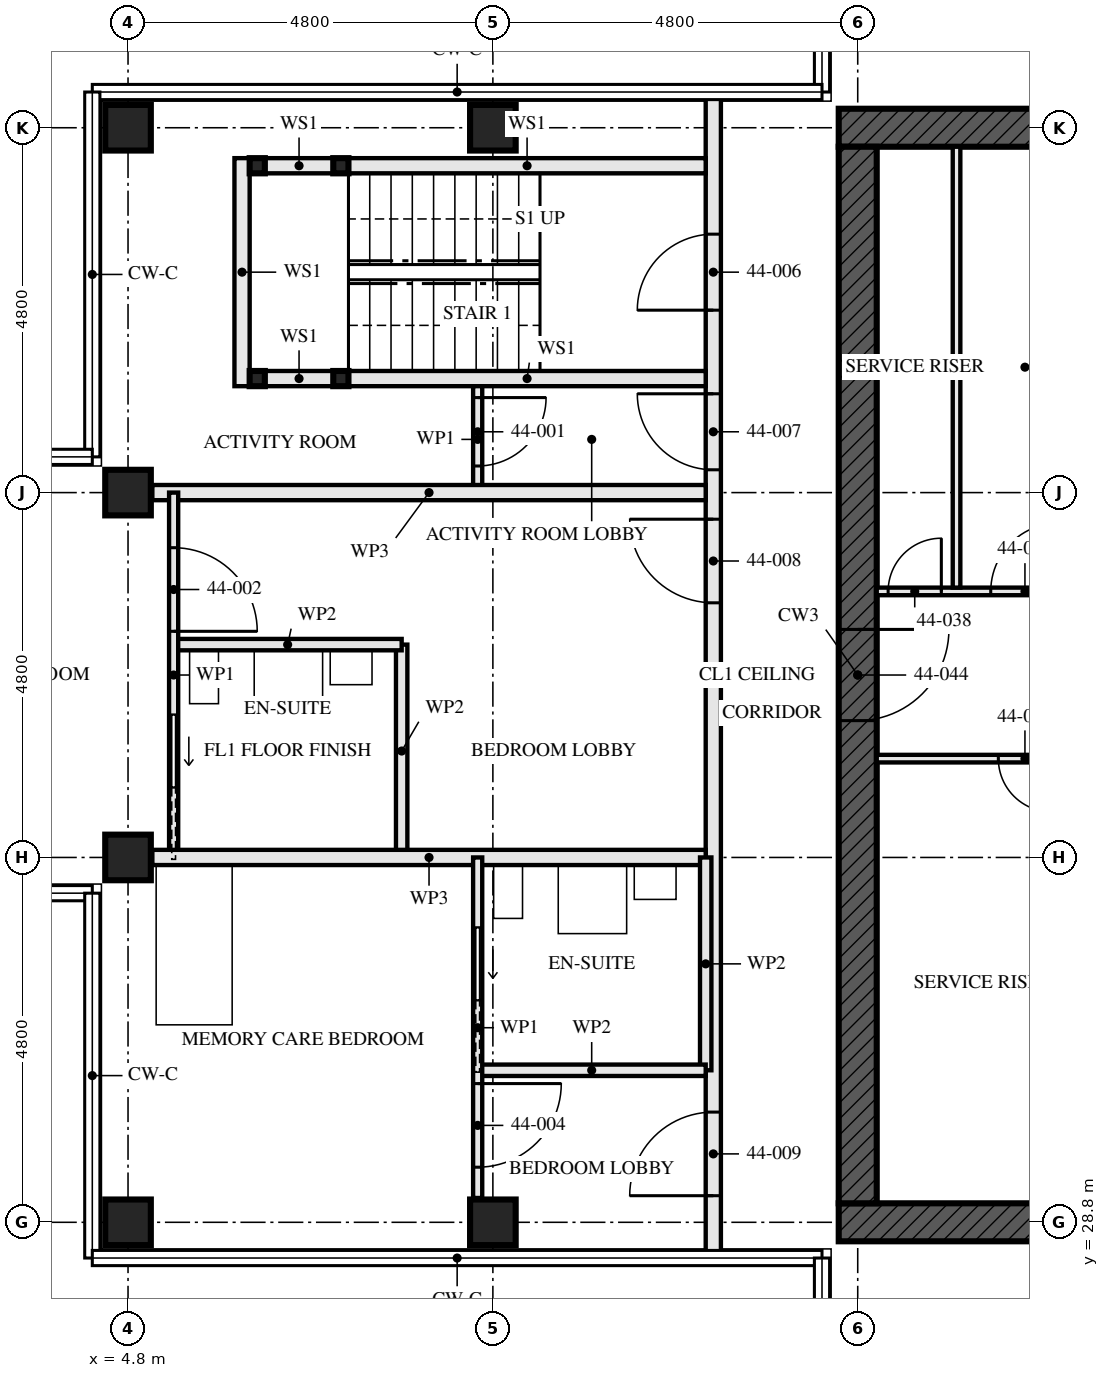
"""IFC4 building model, lengths in metres.
Left out: names, types, materials, properties, quantities, classifications, styles, units other than length and angle.
Written with IfcOpenShell. Run it as: python <this file> out.ifc"""

import sys

from ifc_helpers import new_model, si_unit, direction, frame, frame_2d, origin, origin_2d, place, context, subcontext, project, spatial, rectangle, hollow_rectangle, extrude, element, fill, save


model = new_model("IFC4")
c1 = context("Model", 3, precision=1e-05, world=origin(), true_north=direction((0.0, 1.0)))
c2 = subcontext(c1, "Body", "Model", "MODEL_VIEW")
j1 = project(units=[si_unit("LENGTHUNIT", "METRE"), si_unit("PLANEANGLEUNIT", "RADIAN")], contexts=[c1])
p1 = place(None, origin())
s1 = spatial("IfcSite", under=j1, at=p1, CompositionType="ELEMENT")
p2 = place(p1, origin())
s2 = spatial("IfcBuilding", under=s1, at=p2, CompositionType="ELEMENT")
p3 = place(p2, frame((0.0, 0.0, 162.0)))
s3 = spatial("IfcBuildingStorey", under=s2, at=p3, CompositionType="ELEMENT", Elevation=162.0)
for number, where, z_axis, x_axis in (
    (1, (4.8, 28.8, 0.0), (0.0, 0.0, 1.0), (0.0, 1.0, 0.0)),
    (2, (4.8, 33.6, 0.0), (0.0, 0.0, 1.0), (0.0, 1.0, 0.0)),
    (3, (4.8, 38.4, 0.0), (0.0, 0.0, 1.0), (0.0, 1.0, 0.0)),
    (4, (4.8, 43.2, 0.0), (0.0, 0.0, 1.0), (0.0, 1.0, 0.0)),
):
    element("IfcColumn", number, at=place(p3, frame(where, z_axis=z_axis, x_axis=x_axis)), inside=s3, PredefinedType="COLUMN", context=c2, shape_type="SweptSolid", body=[
        extrude(hollow_rectangle(XDim=0.6, YDim=0.6, WallThickness=0.06, at=origin_2d()), origin(), (0.0, 0.0, 1.0), 3.5),
    ])
for number, where, z_axis, x_axis in (
    (5, (9.6, 28.8, 0.0), (0.0, 0.0, 1.0), (0.0, 1.0, 0.0)),
    (6, (9.6, 43.2, 0.0), (0.0, 0.0, 1.0), (0.0, 1.0, 0.0)),
):
    element("IfcColumn", number, at=place(p3, frame(where, z_axis=z_axis, x_axis=x_axis)), inside=s3, PredefinedType="COLUMN", context=c2, shape_type="SweptSolid", body=[
        extrude(hollow_rectangle(XDim=0.6, YDim=0.6, WallThickness=0.08, at=origin_2d()), origin(), (0.0, 0.0, 1.0), 3.5),
    ])
p4 = place(p3, frame((14.15, 28.8, -0.17), z_axis=(0.0, 0.0, 1.0), x_axis=(1.0, 0.0, 0.0)))
e7 = element("IfcWall", 7, at=p4, inside=s3, PredefinedType="SHEAR", context=c2, shape_type="SweptSolid", body=[
    extrude(rectangle(XDim=14.9, YDim=0.5, at=frame_2d((7.45, 0.0))), origin(), (0.0, 0.0, 1.0), 3.5),
])
p5 = place(p4, frame((6.85, 0.0, 0.17)))
e8 = element("IfcOpeningElement", 8, at=p5, cuts=e7, PredefinedType="OPENING", context=c2, shape_type="SweptSolid", body=[
    extrude(rectangle(XDim=1.2, YDim=2.1, at=frame_2d((0.6, 1.05))), frame((0.0, 0.26, 0.0), z_axis=(0.0, -1.0, 0.0), x_axis=(1.0, 0.0, 0.0)), (0.0, 0.0, 1.0), 0.521),
])
p6 = place(p3, frame((29.05, 43.2, -0.17), z_axis=(0.0, 0.0, 1.0), x_axis=(-1.0, 0.0, 0.0)))
e9 = element("IfcWall", 9, at=p6, inside=s3, PredefinedType="SHEAR", context=c2, shape_type="SweptSolid", body=[
    extrude(rectangle(XDim=14.9, YDim=0.5, at=frame_2d((7.45, 0.0))), origin(), (0.0, 0.0, 1.0), 3.5),
])
p7 = place(p6, frame((6.85, 0.0, 0.17)))
e10 = element("IfcOpeningElement", 10, at=p7, cuts=e9, PredefinedType="OPENING", context=c2, shape_type="SweptSolid", body=[
    extrude(rectangle(XDim=1.2, YDim=2.1, at=frame_2d((0.6, 1.05))), frame((0.0, 0.26, 0.0), z_axis=(0.0, -1.0, 0.0), x_axis=(1.0, 0.0, 0.0)), (0.0, 0.0, 1.0), 0.521),
])
p8 = place(p3, frame((14.4, 42.95, -0.17), z_axis=(0.0, 0.0, 1.0), x_axis=(0.0, -1.0, 0.0)))
e11 = element("IfcWall", 11, at=p8, inside=s3, PredefinedType="SHEAR", context=c2, shape_type="SweptSolid", body=[
    extrude(rectangle(XDim=13.9, YDim=0.5, at=frame_2d((6.95, 0.0))), origin(), (0.0, 0.0, 1.0), 3.5),
])
p9 = place(p8, frame((6.35, 0.0, 0.17)))
e12 = element("IfcOpeningElement", 12, at=p9, cuts=e11, PredefinedType="OPENING", context=c2, shape_type="SweptSolid", body=[
    extrude(rectangle(XDim=1.2, YDim=2.1, at=frame_2d((0.6, 1.05))), frame((0.0, 0.26, 0.0), z_axis=(0.0, -1.0, 0.0), x_axis=(1.0, 0.0, 0.0)), (0.0, 0.0, 1.0), 0.521),
])
for number, where, z_axis, x_axis in (
    (13, (6.5, 42.7, 0.0), (0.0, 0.0, 1.0), (1.0, 0.0, 0.0)),
    (14, (6.5, 39.9, 0.0), (0.0, 0.0, 1.0), (1.0, 0.0, 0.0)),
    (15, (7.6, 42.7, 0.0), (0.0, 0.0, 1.0), (1.0, 0.0, 0.0)),
    (16, (7.6, 39.9, 0.0), (0.0, 0.0, 1.0), (1.0, 0.0, 0.0)),
):
    element("IfcColumn", number, at=place(p3, frame(where, z_axis=z_axis, x_axis=x_axis)), inside=s3, PredefinedType="COLUMN", context=c2, shape_type="SweptSolid", body=[
        extrude(hollow_rectangle(XDim=0.2, YDim=0.2, WallThickness=0.008, at=origin_2d()), origin(), (0.0, 0.0, 1.0), 3.33),
    ])
p10 = place(p3, frame((6.6, 42.7, 0.0), z_axis=(0.0, 0.0, 1.0), x_axis=(1.0, 0.0, 0.0)))
e17 = element("IfcWall", 17, at=p10, inside=s3, PredefinedType="SOLIDWALL", context=c2, shape_type="SweptSolid", body=[
    extrude(rectangle(XDim=0.9, YDim=0.2, at=frame_2d((0.45, 0.0))), origin(), (0.0, 0.0, 1.0), 2.99),
])
p11 = place(p3, frame((7.7, 42.7, 0.0), z_axis=(0.0, 0.0, 1.0), x_axis=(1.0, 0.0, 0.0)))
e18 = element("IfcWall", 18, at=p11, inside=s3, PredefinedType="SOLIDWALL", context=c2, shape_type="SweptSolid", body=[
    extrude(rectangle(XDim=4.7, YDim=0.2, at=frame_2d((2.35, 0.0))), origin(), (0.0, 0.0, 1.0), 2.99),
])
p12 = place(p3, frame((6.6, 39.9, 0.0), z_axis=(0.0, 0.0, 1.0), x_axis=(1.0, 0.0, 0.0)))
e19 = element("IfcWall", 19, at=p12, inside=s3, PredefinedType="SOLIDWALL", context=c2, shape_type="SweptSolid", body=[
    extrude(rectangle(XDim=0.9, YDim=0.2, at=frame_2d((0.45, 0.0))), origin(), (0.0, 0.0, 1.0), 2.99),
])
p13 = place(p3, frame((7.7, 39.9, 0.0), z_axis=(0.0, 0.0, 1.0), x_axis=(1.0, 0.0, 0.0)))
e20 = element("IfcWall", 20, at=p13, inside=s3, PredefinedType="SOLIDWALL", context=c2, shape_type="SweptSolid", body=[
    extrude(rectangle(XDim=4.7, YDim=0.2, at=frame_2d((2.35, 0.0))), origin(), (0.0, 0.0, 1.0), 2.99),
])
p14 = place(p3, frame((6.3, 42.8, 0.0), z_axis=(0.0, 0.0, 1.0), x_axis=(0.0, -1.0, 0.0)))
e21 = element("IfcWall", 21, at=p14, inside=s3, PredefinedType="SOLIDWALL", context=c2, shape_type="SweptSolid", body=[
    extrude(rectangle(XDim=3.0, YDim=0.2, at=frame_2d((1.5, 0.0))), origin(), (0.0, 0.0, 1.0), 3.33),
])
p15 = place(p3, frame((9.4, 39.8, 0.0), z_axis=(0.0, 0.0, 1.0), x_axis=(0.0, -1.0, 0.0)))
e22 = element("IfcWall", 22, at=p15, inside=s3, PredefinedType="PARTITIONING", context=c2, shape_type="SweptSolid", body=[
    extrude(rectangle(XDim=1.4, YDim=0.12, at=frame_2d((0.7, 0.0))), origin(), (0.0, 0.0, 1.0), 3.33),
])
p16 = place(p15, frame((0.15, 0.0, 0.0)))
e23 = element("IfcOpeningElement", 23, at=p16, cuts=e22, PredefinedType="OPENING", context=c2, shape_type="SweptSolid", body=[
    extrude(rectangle(XDim=0.9, YDim=2.1, at=frame_2d((0.45, 1.05))), frame((0.0, 0.071, 0.0), z_axis=(0.0, -1.0, 0.0), x_axis=(1.0, 0.0, 0.0)), (0.0, 0.0, 1.0), 0.141),
])
p17 = place(p3, frame((5.12, 38.4, 0.0), z_axis=(0.0, 0.0, 1.0), x_axis=(1.0, 0.0, 0.0)))
e24 = element("IfcWall", 24, at=p17, inside=s3, PredefinedType="PARTITIONING", context=c2, shape_type="SweptSolid", body=[
    extrude(rectangle(XDim=7.28, YDim=0.2, at=frame_2d((3.64, 0.0))), origin(), (0.0, 0.0, 1.0), 2.55),
])
p18 = place(p3, frame((5.4, 36.4, 0.0), z_axis=(0.0, 0.0, 1.0), x_axis=(1.0, 0.0, 0.0)))
e25 = element("IfcWall", 25, at=p18, inside=s3, PredefinedType="PARTITIONING", context=c2, shape_type="SweptSolid", body=[
    extrude(rectangle(XDim=3.0, YDim=0.15, at=frame_2d((1.5, 0.0))), origin(), (0.0, 0.0, 1.0), 3.33),
])
p19 = place(p3, frame((8.4, 36.4, 0.0), z_axis=(0.0, 0.0, 1.0), x_axis=(0.0, -1.0, 0.0)))
e26 = element("IfcWall", 26, at=p19, inside=s3, PredefinedType="PARTITIONING", context=c2, shape_type="SweptSolid", body=[
    extrude(rectangle(XDim=2.8, YDim=0.15, at=frame_2d((1.4, 0.0))), origin(), (0.0, 0.0, 1.0), 3.33),
])
p20 = place(p3, frame((5.4, 38.4, 0.0), z_axis=(0.0, 0.0, 1.0), x_axis=(0.0, -1.0, 0.0)))
e27 = element("IfcWall", 27, at=p20, inside=s3, PredefinedType="PARTITIONING", context=c2, shape_type="SweptSolid", body=[
    extrude(rectangle(XDim=4.8, YDim=0.12, at=frame_2d((2.4, 0.0))), origin(), (0.0, 0.0, 1.0), 3.33),
])
p21 = place(p20, frame((0.725, 0.0, 0.0)))
e28 = element("IfcOpeningElement", 28, at=p21, cuts=e27, PredefinedType="OPENING", context=c2, shape_type="SweptSolid", body=[
    extrude(rectangle(XDim=1.1, YDim=2.1, at=frame_2d((0.55, 1.05))), frame((0.0, 0.071, 0.0), z_axis=(0.0, -1.0, 0.0), x_axis=(1.0, 0.0, 0.0)), (0.0, 0.0, 1.0), 0.141),
])
p22 = place(p20, frame((2.925, 0.0, 0.0)))
e29 = element("IfcOpeningElement", 29, at=p22, cuts=e27, PredefinedType="OPENING", context=c2, shape_type="SweptSolid", body=[
    extrude(rectangle(XDim=0.95, YDim=2.1, at=frame_2d((0.475, 1.05))), frame((0.0, 0.071, 0.0), z_axis=(0.0, -1.0, 0.0), x_axis=(1.0, 0.0, 0.0)), (0.0, 0.0, 1.0), 0.141),
])
p23 = place(p3, frame((5.12, 33.6, 0.0), z_axis=(0.0, 0.0, 1.0), x_axis=(1.0, 0.0, 0.0)))
e30 = element("IfcWall", 30, at=p23, inside=s3, PredefinedType="PARTITIONING", context=c2, shape_type="SweptSolid", body=[
    extrude(rectangle(XDim=7.28, YDim=0.2, at=frame_2d((3.64, 0.0))), origin(), (0.0, 0.0, 1.0), 2.55),
])
p24 = place(p3, frame((9.4, 30.8, 0.0), z_axis=(0.0, 0.0, 1.0), x_axis=(1.0, 0.0, 0.0)))
e31 = element("IfcWall", 31, at=p24, inside=s3, PredefinedType="PARTITIONING", context=c2, shape_type="SweptSolid", body=[
    extrude(rectangle(XDim=3.0, YDim=0.15, at=frame_2d((1.5, 0.0))), origin(), (0.0, 0.0, 1.0), 3.33),
])
p25 = place(p3, frame((12.4, 33.6, 0.0), z_axis=(0.0, 0.0, 1.0), x_axis=(0.0, -1.0, 0.0)))
e32 = element("IfcWall", 32, at=p25, inside=s3, PredefinedType="PARTITIONING", context=c2, shape_type="SweptSolid", body=[
    extrude(rectangle(XDim=2.8, YDim=0.15, at=frame_2d((1.4, 0.0))), origin(), (0.0, 0.0, 1.0), 3.33),
])
p26 = place(p3, frame((9.4, 33.6, 0.0), z_axis=(0.0, 0.0, 1.0), x_axis=(0.0, -1.0, 0.0)))
e33 = element("IfcWall", 33, at=p26, inside=s3, PredefinedType="PARTITIONING", context=c2, shape_type="SweptSolid", body=[
    extrude(rectangle(XDim=4.48, YDim=0.12, at=frame_2d((2.24, 0.0))), origin(), (0.0, 0.0, 1.0), 3.33),
])
p27 = place(p26, frame((2.975, 0.0, 0.0)))
e34 = element("IfcOpeningElement", 34, at=p27, cuts=e33, PredefinedType="OPENING", context=c2, shape_type="SweptSolid", body=[
    extrude(rectangle(XDim=1.1, YDim=2.1, at=frame_2d((0.55, 1.05))), frame((0.0, 0.071, 0.0), z_axis=(0.0, -1.0, 0.0), x_axis=(1.0, 0.0, 0.0)), (0.0, 0.0, 1.0), 0.141),
])
p28 = place(p26, frame((0.925, 0.0, 0.0)))
e35 = element("IfcOpeningElement", 35, at=p28, cuts=e33, PredefinedType="OPENING", context=c2, shape_type="SweptSolid", body=[
    extrude(rectangle(XDim=0.95, YDim=2.1, at=frame_2d((0.475, 1.05))), frame((0.0, 0.071, 0.0), z_axis=(0.0, -1.0, 0.0), x_axis=(1.0, 0.0, 0.0)), (0.0, 0.0, 1.0), 0.141),
])
p29 = place(p3, frame((12.5, 43.65, 0.0), z_axis=(0.0, 0.0, 1.0), x_axis=(0.0, -1.0, 0.0)))
e36 = element("IfcWall", 36, at=p29, inside=s3, PredefinedType="PARTITIONING", context=c2, shape_type="SweptSolid", body=[
    extrude(rectangle(XDim=15.3, YDim=0.2, at=frame_2d((7.65, 0.0))), origin(), (0.0, 0.0, 1.0), 2.32),
])
p30 = place(p29, frame((1.85, 0.0, 0.0)))
e37 = element("IfcOpeningElement", 37, at=p30, cuts=e36, PredefinedType="OPENING", context=c2, shape_type="SweptSolid", body=[
    extrude(rectangle(XDim=1.0, YDim=2.1, at=frame_2d((0.5, 1.05))), frame((0.0, 0.111, 0.0), z_axis=(0.0, -1.0, 0.0), x_axis=(1.0, 0.0, 0.0)), (0.0, 0.0, 1.0), 0.221),
])
p31 = place(p29, frame((3.95, 0.0, 0.0)))
e38 = element("IfcOpeningElement", 38, at=p31, cuts=e36, PredefinedType="OPENING", context=c2, shape_type="SweptSolid", body=[
    extrude(rectangle(XDim=1.0, YDim=2.1, at=frame_2d((0.5, 1.05))), frame((0.0, 0.111, 0.0), z_axis=(0.0, -1.0, 0.0), x_axis=(1.0, 0.0, 0.0)), (0.0, 0.0, 1.0), 0.221),
])
p32 = place(p29, frame((5.6, 0.0, 0.0)))
e39 = element("IfcOpeningElement", 39, at=p32, cuts=e36, PredefinedType="OPENING", context=c2, shape_type="SweptSolid", body=[
    extrude(rectangle(XDim=1.1, YDim=2.1, at=frame_2d((0.55, 1.05))), frame((0.0, 0.111, 0.0), z_axis=(0.0, -1.0, 0.0), x_axis=(1.0, 0.0, 0.0)), (0.0, 0.0, 1.0), 0.221),
])
p33 = place(p29, frame((13.4, 0.0, 0.0)))
e40 = element("IfcOpeningElement", 40, at=p33, cuts=e36, PredefinedType="OPENING", context=c2, shape_type="SweptSolid", body=[
    extrude(rectangle(XDim=1.1, YDim=2.1, at=frame_2d((0.55, 1.05))), frame((0.0, 0.111, 0.0), z_axis=(0.0, -1.0, 0.0), x_axis=(1.0, 0.0, 0.0)), (0.0, 0.0, 1.0), 0.221),
])
p34 = place(p3, frame((15.7, 37.15, 0.0), z_axis=(0.0, 0.0, 1.0), x_axis=(0.0, 1.0, 0.0)))
e41 = element("IfcWall", 41, at=p34, inside=s3, PredefinedType="SOLIDWALL", context=c2, shape_type="SweptSolid", body=[
    extrude(rectangle(XDim=5.8, YDim=0.1, at=frame_2d((2.9, 0.0))), origin(), (0.0, 0.0, 1.0), 3.33),
])
p35 = place(p3, frame((14.65, 34.9, 0.0), z_axis=(0.0, 0.0, 1.0), x_axis=(1.0, 0.0, 0.0)))
e42 = element("IfcWall", 42, at=p35, inside=s3, PredefinedType="SOLIDWALL", context=c2, shape_type="SweptSolid", body=[
    extrude(rectangle(XDim=5.9, YDim=0.1, at=frame_2d((2.95, 0.0))), origin(), (0.0, 0.0, 1.0), 3.33),
])
p36 = place(p35, frame((1.6, 0.0, 0.0)))
e43 = element("IfcOpeningElement", 43, at=p36, cuts=e42, PredefinedType="OPENING", context=c2, shape_type="SweptSolid", body=[
    extrude(rectangle(XDim=0.7, YDim=2.1, at=frame_2d((0.35, 1.05))), frame((0.0, 0.061, 0.0), z_axis=(0.0, -1.0, 0.0), x_axis=(1.0, 0.0, 0.0)), (0.0, 0.0, 1.0), 0.121),
])
p37 = place(p3, frame((14.65, 37.1, 0.0), z_axis=(0.0, 0.0, 1.0), x_axis=(1.0, 0.0, 0.0)))
e44 = element("IfcWall", 44, at=p37, inside=s3, PredefinedType="SOLIDWALL", context=c2, shape_type="SweptSolid", body=[
    extrude(rectangle(XDim=5.9, YDim=0.1, at=frame_2d((2.95, 0.0))), origin(), (0.0, 0.0, 1.0), 3.33),
])
p38 = place(p37, frame((0.15, 0.0, 0.0)))
e45 = element("IfcOpeningElement", 45, at=p38, cuts=e44, PredefinedType="OPENING", context=c2, shape_type="SweptSolid", body=[
    extrude(rectangle(XDim=0.7, YDim=2.1, at=frame_2d((0.35, 1.05))), frame((0.0, 0.061, 0.0), z_axis=(0.0, -1.0, 0.0), x_axis=(1.0, 0.0, 0.0)), (0.0, 0.0, 1.0), 0.121),
])
p39 = place(p37, frame((1.5, 0.0, 0.0)))
e46 = element("IfcOpeningElement", 46, at=p39, cuts=e44, PredefinedType="OPENING", context=c2, shape_type="SweptSolid", body=[
    extrude(rectangle(XDim=0.9, YDim=2.1, at=frame_2d((0.45, 1.05))), frame((0.0, 0.061, 0.0), z_axis=(0.0, -1.0, 0.0), x_axis=(1.0, 0.0, 0.0)), (0.0, 0.0, 1.0), 0.121),
])
p40 = place(p16, origin())
e47 = element("IfcDoor", 47, at=p40, inside=s3, OperationType="SINGLE_SWING_RIGHT", PredefinedType="DOOR", context=c2, shape_type="SweptSolid", body=[
    extrude(rectangle(XDim=0.9, YDim=2.1, at=frame_2d((0.45, 1.05))), frame((0.0, 0.022, 0.0), z_axis=(0.0, -1.0, 0.0), x_axis=(1.0, 0.0, 0.0)), (0.0, 0.0, 1.0), 0.044),
])
fill(e23, e47)
p41 = place(p21, origin())
e48 = element("IfcDoor", 48, at=p41, inside=s3, OperationType="SINGLE_SWING_LEFT", PredefinedType="DOOR", context=c2, shape_type="SweptSolid", body=[
    extrude(rectangle(XDim=1.1, YDim=2.1, at=frame_2d((0.55, 1.05))), frame((0.0, 0.022, 0.0), z_axis=(0.0, -1.0, 0.0), x_axis=(1.0, 0.0, 0.0)), (0.0, 0.0, 1.0), 0.044),
])
fill(e28, e48)
p42 = place(p22, origin())
e49 = element("IfcDoor", 49, at=p42, inside=s3, OperationType="SLIDING_TO_LEFT", PredefinedType="DOOR", context=c2, shape_type="SweptSolid", body=[
    extrude(rectangle(XDim=0.95, YDim=2.1, at=frame_2d((0.475, 1.05))), frame((0.0, 0.022, 0.0), z_axis=(0.0, -1.0, 0.0), x_axis=(1.0, 0.0, 0.0)), (0.0, 0.0, 1.0), 0.044),
])
fill(e29, e49)
p43 = place(p27, origin())
e50 = element("IfcDoor", 50, at=p43, inside=s3, OperationType="SINGLE_SWING_RIGHT", PredefinedType="DOOR", context=c2, shape_type="SweptSolid", body=[
    extrude(rectangle(XDim=1.1, YDim=2.1, at=frame_2d((0.55, 1.05))), frame((0.0, 0.022, 0.0), z_axis=(0.0, -1.0, 0.0), x_axis=(1.0, 0.0, 0.0)), (0.0, 0.0, 1.0), 0.044),
])
fill(e34, e50)
p44 = place(p28, origin())
e51 = element("IfcDoor", 51, at=p44, inside=s3, OperationType="SLIDING_TO_LEFT", PredefinedType="DOOR", context=c2, shape_type="SweptSolid", body=[
    extrude(rectangle(XDim=0.95, YDim=2.1, at=frame_2d((0.475, 1.05))), frame((0.0, 0.022, 0.0), z_axis=(0.0, -1.0, 0.0), x_axis=(1.0, 0.0, 0.0)), (0.0, 0.0, 1.0), 0.044),
])
fill(e35, e51)
p45 = place(p30, frame((1.0, 0.0, 0.0), z_axis=(0.0, 0.0, 1.0), x_axis=(-1.0, 0.0, 0.0)))
e52 = element("IfcDoor", 52, at=p45, inside=s3, OperationType="SINGLE_SWING_RIGHT", PredefinedType="DOOR", context=c2, shape_type="SweptSolid", body=[
    extrude(rectangle(XDim=1.0, YDim=2.1, at=frame_2d((0.5, 1.05))), frame((0.0, 0.032, 0.0), z_axis=(0.0, -1.0, 0.0), x_axis=(1.0, 0.0, 0.0)), (0.0, 0.0, 1.0), 0.064),
])
fill(e37, e52)
p46 = place(p31, frame((1.0, 0.0, 0.0), z_axis=(0.0, 0.0, 1.0), x_axis=(-1.0, 0.0, 0.0)))
e53 = element("IfcDoor", 53, at=p46, inside=s3, OperationType="SINGLE_SWING_LEFT", PredefinedType="DOOR", context=c2, shape_type="SweptSolid", body=[
    extrude(rectangle(XDim=1.0, YDim=2.1, at=frame_2d((0.5, 1.05))), frame((0.0, 0.027, 0.0), z_axis=(0.0, -1.0, 0.0), x_axis=(1.0, 0.0, 0.0)), (0.0, 0.0, 1.0), 0.054),
])
fill(e38, e53)
p47 = place(p32, frame((1.1, 0.0, 0.0), z_axis=(0.0, 0.0, 1.0), x_axis=(-1.0, 0.0, 0.0)))
e54 = element("IfcDoor", 54, at=p47, inside=s3, OperationType="SINGLE_SWING_LEFT", PredefinedType="DOOR", context=c2, shape_type="SweptSolid", body=[
    extrude(rectangle(XDim=1.1, YDim=2.1, at=frame_2d((0.55, 1.05))), frame((0.0, 0.027, 0.0), z_axis=(0.0, -1.0, 0.0), x_axis=(1.0, 0.0, 0.0)), (0.0, 0.0, 1.0), 0.054),
])
fill(e39, e54)
p48 = place(p33, frame((1.1, 0.0, 0.0), z_axis=(0.0, 0.0, 1.0), x_axis=(-1.0, 0.0, 0.0)))
e55 = element("IfcDoor", 55, at=p48, inside=s3, OperationType="SINGLE_SWING_RIGHT", PredefinedType="DOOR", context=c2, shape_type="SweptSolid", body=[
    extrude(rectangle(XDim=1.1, YDim=2.1, at=frame_2d((0.55, 1.05))), frame((0.0, 0.027, 0.0), z_axis=(0.0, -1.0, 0.0), x_axis=(1.0, 0.0, 0.0)), (0.0, 0.0, 1.0), 0.054),
])
fill(e40, e55)
p49 = place(p36, frame((0.7, 0.0, 0.0), z_axis=(0.0, 0.0, 1.0), x_axis=(-1.0, 0.0, 0.0)))
e56 = element("IfcDoor", 56, at=p49, inside=s3, OperationType="SINGLE_SWING_RIGHT", PredefinedType="DOOR", context=c2, shape_type="SweptSolid", body=[
    extrude(rectangle(XDim=0.7, YDim=2.1, at=frame_2d((0.35, 1.05))), frame((0.0, 0.027, 0.0), z_axis=(0.0, -1.0, 0.0), x_axis=(1.0, 0.0, 0.0)), (0.0, 0.0, 1.0), 0.054),
])
fill(e43, e56)
p50 = place(p38, origin())
e57 = element("IfcDoor", 57, at=p50, inside=s3, OperationType="SINGLE_SWING_LEFT", PredefinedType="DOOR", context=c2, shape_type="SweptSolid", body=[
    extrude(rectangle(XDim=0.7, YDim=2.1, at=frame_2d((0.35, 1.05))), frame((0.0, 0.027, 0.0), z_axis=(0.0, -1.0, 0.0), x_axis=(1.0, 0.0, 0.0)), (0.0, 0.0, 1.0), 0.054),
])
fill(e45, e57)
p51 = place(p39, origin())
e58 = element("IfcDoor", 58, at=p51, inside=s3, OperationType="SINGLE_SWING_LEFT", PredefinedType="DOOR", context=c2, shape_type="SweptSolid", body=[
    extrude(rectangle(XDim=0.9, YDim=2.1, at=frame_2d((0.45, 1.05))), frame((0.0, 0.027, 0.0), z_axis=(0.0, -1.0, 0.0), x_axis=(1.0, 0.0, 0.0)), (0.0, 0.0, 1.0), 0.054),
])
fill(e46, e58)
p52 = place(p9, origin())
e59 = element("IfcDoor", 59, at=p52, inside=s3, OperationType="SINGLE_SWING_LEFT", PredefinedType="DOOR", context=c2, shape_type="SweptSolid", body=[
    extrude(rectangle(XDim=1.2, YDim=2.1, at=frame_2d((0.6, 1.05))), frame((0.0, 0.027, 0.0), z_axis=(0.0, -1.0, 0.0), x_axis=(1.0, 0.0, 0.0)), (0.0, 0.0, 1.0), 0.054),
])
fill(e12, e59)
save(model, sys.argv[1])
